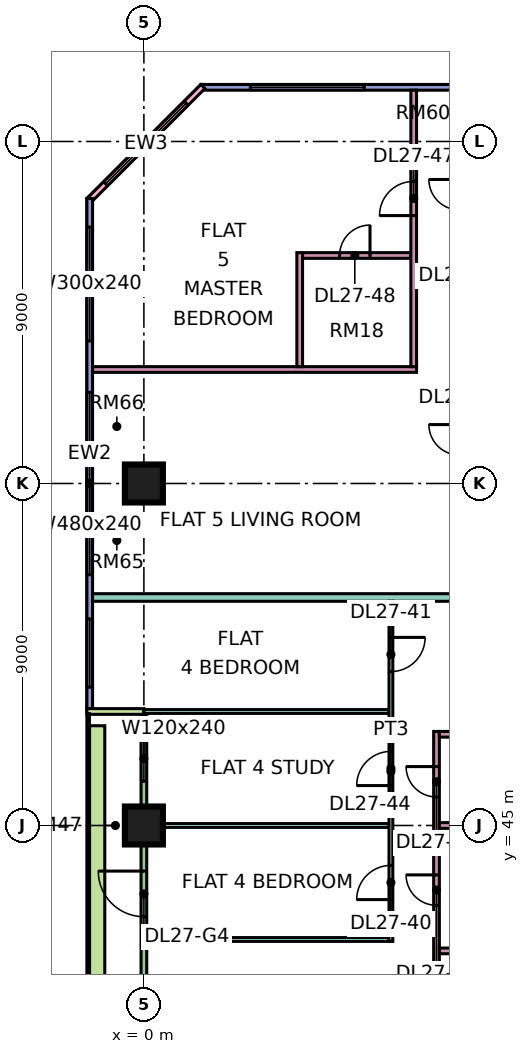
"""IFC4 building model, lengths in metres.
Left out: names, types, materials, properties, quantities, classifications, styles, units other than length and angle.
Written with IfcOpenShell. Run it as: python <this file> out.ifc"""

import sys

from ifc_helpers import new_model, si_unit, direction, frame, frame_2d, origin, origin_2d, place, context, subcontext, project, spatial, rectangle, extrude, element, fill, save


model = new_model("IFC4")
c1 = context("Model", 3, precision=1e-05, world=origin(), true_north=direction((0.0, 1.0)))
c2 = subcontext(c1, "Body", "Model", "MODEL_VIEW")
j1 = project(units=[si_unit("LENGTHUNIT", "METRE"), si_unit("PLANEANGLEUNIT", "RADIAN")], contexts=[c1])
p1 = place(None, origin())
s1 = spatial("IfcSite", under=j1, at=p1, CompositionType="ELEMENT")
p2 = place(p1, origin())
s2 = spatial("IfcBuilding", under=s1, at=p2, CompositionType="ELEMENT")
p3 = place(p2, frame((0.0, 0.0, 118.15)))
s3 = spatial("IfcBuildingStorey", under=s2, at=p3, CompositionType="ELEMENT", Elevation=118.15)
for number, where, z_axis, x_axis in (
    (1, (0.0, 45.0, 0.0), (0.0, 0.0, 1.0), (1.0, 0.0, 0.0)),
    (2, (0.0, 54.0, 0.0), (0.0, 0.0, 1.0), (1.0, 0.0, 0.0)),
):
    element("IfcColumn", number, at=place(p3, frame(where, z_axis=z_axis, x_axis=x_axis)), inside=s3, PredefinedType="COLUMN", context=c2, shape_type="SweptSolid", body=[
        extrude(rectangle(XDim=1.0, YDim=1.0, at=origin_2d()), origin(), (0.0, 0.0, 1.0), 3.75),
    ])
p4 = place(p3, frame((11.925, 64.425, 0.0), z_axis=(0.0, 0.0, 1.0), x_axis=(-1.0, 0.0, 0.0)))
e3 = element("IfcWall", 3, at=p4, inside=s3, PredefinedType="SOLIDWALL", context=c2, shape_type="SweptSolid", body=[
    extrude(rectangle(XDim=10.425, YDim=0.15, at=frame_2d((5.212, 0.0))), origin(), (0.0, 0.0, 1.0), 3.35),
])
p5 = place(p4, frame((1.212, 0.0, 1.7)))
e4 = element("IfcOpeningElement", 4, at=p5, cuts=e3, PredefinedType="OPENING", context=c2, shape_type="SweptSolid", body=[
    extrude(rectangle(XDim=1.2, YDim=0.9, at=frame_2d((0.6, 0.45))), frame((0.0, 0.085, 0.0), z_axis=(0.0, -1.0, 0.0), x_axis=(1.0, 0.0, 0.0)), (0.0, 0.0, 1.0), 0.17),
])
p6 = place(p4, frame((6.125, 0.0, 0.45)))
e5 = element("IfcOpeningElement", 5, at=p6, cuts=e3, PredefinedType="OPENING", context=c2, shape_type="SweptSolid", body=[
    extrude(rectangle(XDim=3.0, YDim=2.4, at=frame_2d((1.5, 1.2))), frame((0.0, 0.085, 0.0), z_axis=(0.0, -1.0, 0.0), x_axis=(1.0, 0.0, 0.0)), (0.0, 0.0, 1.0), 0.17),
])
p7 = place(p3, frame((1.553, 64.447, 0.0), z_axis=(0.0, 0.0, 1.0), x_axis=(-0.707106781187, -0.707106781187, 0.0)))
e6 = element("IfcWall", 6, at=p7, inside=s3, PredefinedType="SOLIDWALL", context=c2, shape_type="SweptSolid", body=[
    extrude(rectangle(XDim=4.243, YDim=0.15, at=frame_2d((2.121, 0.0))), origin(), (0.0, 0.0, 1.0), 3.35),
])
p8 = place(p7, frame((0.621, 0.0, 0.45)))
e7 = element("IfcOpeningElement", 7, at=p8, cuts=e6, PredefinedType="OPENING", context=c2, shape_type="SweptSolid", body=[
    extrude(rectangle(XDim=3.0, YDim=2.4, at=frame_2d((1.5, 1.2))), frame((0.0, 0.085, 0.0), z_axis=(0.0, -1.0, 0.0), x_axis=(1.0, 0.0, 0.0)), (0.0, 0.0, 1.0), 0.17),
])
p9 = place(p3, frame((-1.425, 61.5, 0.0), z_axis=(0.0, 0.0, 1.0), x_axis=(0.0, -1.0, 0.0)))
e8 = element("IfcWall", 8, at=p9, inside=s3, PredefinedType="SOLIDWALL", context=c2, shape_type="SweptSolid", body=[
    extrude(rectangle(XDim=13.425, YDim=0.15, at=frame_2d((6.712, 0.0))), origin(), (0.0, 0.0, 1.0), 3.35),
])
p10 = place(p9, frame((0.75, 0.0, 0.45)))
e9 = element("IfcOpeningElement", 9, at=p10, cuts=e8, PredefinedType="OPENING", context=c2, shape_type="SweptSolid", body=[
    extrude(rectangle(XDim=3.0, YDim=2.4, at=frame_2d((1.5, 1.2))), frame((0.0, 0.085, 0.0), z_axis=(0.0, -1.0, 0.0), x_axis=(1.0, 0.0, 0.0)), (0.0, 0.0, 1.0), 0.17),
])
p11 = place(p9, frame((5.1, 0.0, 0.45)))
e10 = element("IfcOpeningElement", 10, at=p11, cuts=e8, PredefinedType="OPENING", context=c2, shape_type="SweptSolid", body=[
    extrude(rectangle(XDim=4.8, YDim=2.4, at=frame_2d((2.4, 1.2))), frame((0.0, 0.085, 0.0), z_axis=(0.0, -1.0, 0.0), x_axis=(1.0, 0.0, 0.0)), (0.0, 0.0, 1.0), 0.17),
])
p12 = place(p9, frame((11.062, 0.0, 0.45)))
e11 = element("IfcOpeningElement", 11, at=p12, cuts=e8, PredefinedType="OPENING", context=c2, shape_type="SweptSolid", body=[
    extrude(rectangle(XDim=1.8, YDim=2.4, at=frame_2d((0.9, 1.2))), frame((0.0, 0.085, 0.0), z_axis=(0.0, -1.0, 0.0), x_axis=(1.0, 0.0, 0.0)), (0.0, 0.0, 1.0), 0.17),
])
p13 = place(p3, frame((0.0, 47.925, 0.0), z_axis=(0.0, 0.0, 1.0), x_axis=(0.0, -1.0, 0.0)))
e12 = element("IfcWall", 12, at=p13, inside=s3, PredefinedType="SOLIDWALL", context=c2, shape_type="SweptSolid", body=[
    extrude(rectangle(XDim=11.85, YDim=0.15, at=frame_2d((5.925, 0.0))), origin(), (0.0, 0.0, 1.0), 3.35),
])
p14 = place(p13, frame((0.562, 0.0, 0.45)))
e13 = element("IfcOpeningElement", 13, at=p14, cuts=e12, PredefinedType="OPENING", context=c2, shape_type="SweptSolid", body=[
    extrude(rectangle(XDim=1.2, YDim=2.4, at=frame_2d((0.6, 1.2))), frame((0.0, 0.085, 0.0), z_axis=(0.0, -1.0, 0.0), x_axis=(1.0, 0.0, 0.0)), (0.0, 0.0, 1.0), 0.17),
])
p15 = place(p13, frame((4.125, 0.0, 0.0)))
e14 = element("IfcOpeningElement", 14, at=p15, cuts=e12, PredefinedType="OPENING", context=c2, shape_type="SweptSolid", body=[
    extrude(rectangle(XDim=1.2, YDim=2.4, at=frame_2d((0.6, 1.2))), frame((0.0, 0.085, 0.0), z_axis=(0.0, -1.0, 0.0), x_axis=(1.0, 0.0, 0.0)), (0.0, 0.0, 1.0), 0.17),
])
p16 = place(p13, frame((7.125, 0.0, 0.45)))
e15 = element("IfcOpeningElement", 15, at=p16, cuts=e12, PredefinedType="OPENING", context=c2, shape_type="SweptSolid", body=[
    extrude(rectangle(XDim=3.0, YDim=2.4, at=frame_2d((1.5, 1.2))), frame((0.0, 0.085, 0.0), z_axis=(0.0, -1.0, 0.0), x_axis=(1.0, 0.0, 0.0)), (0.0, 0.0, 1.0), 0.17),
])
p17 = place(p3, frame((-1.5, 48.0, 0.0), z_axis=(0.0, 0.0, 1.0), x_axis=(1.0, 0.0, 0.0)))
e16 = element("IfcWall", 16, at=p17, inside=s3, PredefinedType="SOLIDWALL", context=c2, shape_type="SweptSolid", body=[
    extrude(rectangle(XDim=1.5, YDim=0.15, at=frame_2d((0.75, 0.0))), origin(), (0.0, 0.0, 1.0), 3.35),
])
p18 = place(p3, frame((-1.229, 47.625, 0.0), z_axis=(0.0, 0.0, 1.0), x_axis=(0.0, -1.0, 0.0)))
e17 = element("IfcWall", 17, at=p18, inside=s3, PredefinedType="SOLIDWALL", context=c2, shape_type="SweptSolid", body=[
    extrude(rectangle(XDim=11.25, YDim=0.4, at=frame_2d((5.625, 0.0))), origin(), (0.0, 0.0, 1.0), 0.7),
])
p19 = place(p3, frame((0.0, 48.0, 0.0), z_axis=(0.0, 0.0, 1.0), x_axis=(1.0, 0.0, 0.0)))
e18 = element("IfcWall", 18, at=p19, inside=s3, PredefinedType="PARTITIONING", context=c2, shape_type="SweptSolid", body=[
    extrude(rectangle(XDim=6.45, YDim=0.1, at=frame_2d((3.225, 0.0))), origin(), (0.0, 0.0, 1.0), 3.35),
])
p20 = place(p3, frame((-1.35, 51.0, 0.0), z_axis=(0.0, 0.0, 1.0), x_axis=(1.0, 0.0, 0.0)))
e19 = element("IfcWall", 19, at=p20, inside=s3, PredefinedType="PARTITIONING", context=c2, shape_type="SweptSolid", body=[
    extrude(rectangle(XDim=13.75, YDim=0.2, at=frame_2d((6.875, 0.0))), origin(), (0.0, 0.0, 1.0), 3.35),
])
p21 = place(p3, frame((-1.35, 57.0, 0.0), z_axis=(0.0, 0.0, 1.0), x_axis=(1.0, 0.0, 0.0)))
e20 = element("IfcWall", 20, at=p21, inside=s3, PredefinedType="PARTITIONING", context=c2, shape_type="SweptSolid", body=[
    extrude(rectangle(XDim=8.525, YDim=0.15, at=frame_2d((4.263, 0.0))), origin(), (0.0, 0.0, 1.0), 3.35),
])
for number, where, z_axis, x_axis in (
    (21, (0.074, 42.0, 0.0), (0.0, 0.0, 1.0), (1.0, 0.0, 0.0)),
    (22, (0.074, 45.0, 0.0), (0.0, 0.0, 1.0), (1.0, 0.0, 0.0)),
):
    element("IfcWall", number, at=place(p3, frame(where, z_axis=z_axis, x_axis=x_axis)), inside=s3, PredefinedType="PARTITIONING", context=c2, shape_type="SweptSolid", body=[
        extrude(rectangle(XDim=6.376, YDim=0.1, at=frame_2d((3.188, 0.0))), origin(), (0.0, 0.0, 1.0), 3.35),
    ])
p22 = place(p3, frame((4.1, 57.075, 0.0), z_axis=(0.0, 0.0, 1.0), x_axis=(0.0, 1.0, 0.0)))
e23 = element("IfcWall", 23, at=p22, inside=s3, PredefinedType="PARTITIONING", context=c2, shape_type="SweptSolid", body=[
    extrude(rectangle(XDim=3.0, YDim=0.15, at=frame_2d((1.5, 0.0))), origin(), (0.0, 0.0, 1.0), 3.35),
])
p23 = place(p3, frame((4.175, 60.0, 0.0), z_axis=(0.0, 0.0, 1.0), x_axis=(1.0, 0.0, 0.0)))
e24 = element("IfcWall", 24, at=p23, inside=s3, PredefinedType="PARTITIONING", context=c2, shape_type="SweptSolid", body=[
    extrude(rectangle(XDim=2.85, YDim=0.15, at=frame_2d((1.425, 0.0))), origin(), (0.0, 0.0, 1.0), 3.35),
])
p24 = place(p23, frame((0.975, 0.0, 0.0)))
e25 = element("IfcOpeningElement", 25, at=p24, cuts=e24, PredefinedType="OPENING", context=c2, shape_type="SweptSolid", body=[
    extrude(rectangle(XDim=0.8, YDim=2.1, at=frame_2d((0.4, 1.05))), frame((0.0, 0.085, 0.0), z_axis=(0.0, -1.0, 0.0), x_axis=(1.0, 0.0, 0.0)), (0.0, 0.0, 1.0), 0.17),
])
p25 = place(p3, frame((6.5, 41.95, 0.0), z_axis=(0.0, 0.0, 1.0), x_axis=(0.0, 1.0, 0.0)))
e26 = element("IfcWall", 26, at=p25, inside=s3, PredefinedType="PARTITIONING", context=c2, shape_type="SweptSolid", body=[
    extrude(rectangle(XDim=8.95, YDim=0.1, at=frame_2d((4.475, 0.0))), origin(), (0.0, 0.0, 1.0), 3.35),
])
p26 = place(p25, frame((1.1, 0.0, 0.0)))
e27 = element("IfcOpeningElement", 27, at=p26, cuts=e26, PredefinedType="OPENING", context=c2, shape_type="SweptSolid", body=[
    extrude(rectangle(XDim=0.9, YDim=2.1, at=frame_2d((0.45, 1.05))), frame((0.0, 0.06, 0.0), z_axis=(0.0, -1.0, 0.0), x_axis=(1.0, 0.0, 0.0)), (0.0, 0.0, 1.0), 0.12),
])
p27 = place(p25, frame((7.1, 0.0, 0.0)))
e28 = element("IfcOpeningElement", 28, at=p27, cuts=e26, PredefinedType="OPENING", context=c2, shape_type="SweptSolid", body=[
    extrude(rectangle(XDim=0.9, YDim=2.1, at=frame_2d((0.45, 1.05))), frame((0.0, 0.06, 0.0), z_axis=(0.0, -1.0, 0.0), x_axis=(1.0, 0.0, 0.0)), (0.0, 0.0, 1.0), 0.12),
])
p28 = place(p25, frame((4.1, 0.0, 0.0)))
e29 = element("IfcOpeningElement", 29, at=p28, cuts=e26, PredefinedType="OPENING", context=c2, shape_type="SweptSolid", body=[
    extrude(rectangle(XDim=0.9, YDim=2.1, at=frame_2d((0.45, 1.05))), frame((0.0, 0.06, 0.0), z_axis=(0.0, -1.0, 0.0), x_axis=(1.0, 0.0, 0.0)), (0.0, 0.0, 1.0), 0.12),
])
p29 = place(p3, frame((7.1, 57.075, 0.0), z_axis=(0.0, 0.0, 1.0), x_axis=(0.0, 1.0, 0.0)))
e30 = element("IfcWall", 30, at=p29, inside=s3, PredefinedType="PARTITIONING", context=c2, shape_type="SweptSolid", body=[
    extrude(rectangle(XDim=7.275, YDim=0.15, at=frame_2d((3.638, 0.0))), origin(), (0.0, 0.0, 1.0), 3.35),
])
p30 = place(p29, frame((3.975, 0.0, 0.0)))
e31 = element("IfcOpeningElement", 31, at=p30, cuts=e30, PredefinedType="OPENING", context=c2, shape_type="SweptSolid", body=[
    extrude(rectangle(XDim=0.9, YDim=2.1, at=frame_2d((0.45, 1.05))), frame((0.0, 0.085, 0.0), z_axis=(0.0, -1.0, 0.0), x_axis=(1.0, 0.0, 0.0)), (0.0, 0.0, 1.0), 0.17),
])
p31 = place(p3, frame((7.7, 36.1, 0.0), z_axis=(0.0, 0.0, 1.0), x_axis=(0.0, 1.0, 0.0)))
e32 = element("IfcWall", 32, at=p31, inside=s3, PredefinedType="PARTITIONING", context=c2, shape_type="SweptSolid", body=[
    extrude(rectangle(XDim=11.375, YDim=0.15, at=frame_2d((5.688, 0.0))), origin(), (0.0, 0.0, 1.0), 3.35),
])
p32 = place(p31, frame((9.65, 0.0, 0.0)))
e33 = element("IfcOpeningElement", 33, at=p32, cuts=e32, PredefinedType="OPENING", context=c2, shape_type="SweptSolid", body=[
    extrude(rectangle(XDim=0.8, YDim=2.1, at=frame_2d((0.4, 1.05))), frame((0.0, 0.085, 0.0), z_axis=(0.0, -1.0, 0.0), x_axis=(1.0, 0.0, 0.0)), (0.0, 0.0, 1.0), 0.17),
])
p33 = place(p31, frame((2.3, 0.0, 0.0)))
e34 = element("IfcOpeningElement", 34, at=p33, cuts=e32, PredefinedType="OPENING", context=c2, shape_type="SweptSolid", body=[
    extrude(rectangle(XDim=0.9, YDim=2.1, at=frame_2d((0.45, 1.05))), frame((0.0, 0.085, 0.0), z_axis=(0.0, -1.0, 0.0), x_axis=(1.0, 0.0, 0.0)), (0.0, 0.0, 1.0), 0.17),
])
p34 = place(p31, frame((6.8, 0.0, 0.0)))
e35 = element("IfcOpeningElement", 35, at=p34, cuts=e32, PredefinedType="OPENING", context=c2, shape_type="SweptSolid", body=[
    extrude(rectangle(XDim=0.8, YDim=2.1, at=frame_2d((0.4, 1.05))), frame((0.0, 0.085, 0.0), z_axis=(0.0, -1.0, 0.0), x_axis=(1.0, 0.0, 0.0)), (0.0, 0.0, 1.0), 0.17),
])
for number, where, z_axis, x_axis in (
    (36, (7.775, 41.7, 0.0), (0.0, 0.0, 1.0), (1.0, 0.0, 0.0)),
    (37, (7.775, 45.0, 0.0), (0.0, 0.0, 1.0), (1.0, 0.0, 0.0)),
    (38, (7.775, 47.4, 0.0), (0.0, 0.0, 1.0), (1.0, 0.0, 0.0)),
):
    element("IfcWall", number, at=place(p3, frame(where, z_axis=z_axis, x_axis=x_axis)), inside=s3, PredefinedType="PARTITIONING", context=c2, shape_type="SweptSolid", body=[
        extrude(rectangle(XDim=4.625, YDim=0.15, at=frame_2d((2.312, 0.0))), origin(), (0.0, 0.0, 1.0), 3.35),
    ])
p35 = place(p6, origin())
e39 = element("IfcWindow", 39, at=p35, inside=s3, PartitioningType="SINGLE_PANEL", PredefinedType="WINDOW", context=c2, shape_type="SweptSolid", body=[
    extrude(rectangle(XDim=3.0, YDim=2.4, at=frame_2d((1.5, 1.2))), frame((0.0, 0.03, 0.0), z_axis=(0.0, -1.0, 0.0), x_axis=(1.0, 0.0, 0.0)), (0.0, 0.0, 1.0), 0.06),
])
fill(e5, e39)
p36 = place(p8, origin())
e40 = element("IfcWindow", 40, at=p36, inside=s3, PartitioningType="SINGLE_PANEL", PredefinedType="WINDOW", context=c2, shape_type="SweptSolid", body=[
    extrude(rectangle(XDim=3.0, YDim=2.4, at=frame_2d((1.5, 1.2))), frame((0.0, 0.03, 0.0), z_axis=(0.0, -1.0, 0.0), x_axis=(1.0, 0.0, 0.0)), (0.0, 0.0, 1.0), 0.06),
])
fill(e7, e40)
p37 = place(p10, origin())
e41 = element("IfcWindow", 41, at=p37, inside=s3, PartitioningType="SINGLE_PANEL", PredefinedType="WINDOW", context=c2, shape_type="SweptSolid", body=[
    extrude(rectangle(XDim=3.0, YDim=2.4, at=frame_2d((1.5, 1.2))), frame((0.0, 0.03, 0.0), z_axis=(0.0, -1.0, 0.0), x_axis=(1.0, 0.0, 0.0)), (0.0, 0.0, 1.0), 0.06),
])
fill(e9, e41)
p38 = place(p11, origin())
e42 = element("IfcWindow", 42, at=p38, inside=s3, PartitioningType="SINGLE_PANEL", PredefinedType="WINDOW", context=c2, shape_type="SweptSolid", body=[
    extrude(rectangle(XDim=4.8, YDim=2.4, at=frame_2d((2.4, 1.2))), frame((0.0, 0.03, 0.0), z_axis=(0.0, -1.0, 0.0), x_axis=(1.0, 0.0, 0.0)), (0.0, 0.0, 1.0), 0.06),
])
fill(e10, e42)
p39 = place(p12, origin())
e43 = element("IfcWindow", 43, at=p39, inside=s3, PartitioningType="SINGLE_PANEL", PredefinedType="WINDOW", context=c2, shape_type="SweptSolid", body=[
    extrude(rectangle(XDim=1.8, YDim=2.4, at=frame_2d((0.9, 1.2))), frame((0.0, 0.03, 0.0), z_axis=(0.0, -1.0, 0.0), x_axis=(1.0, 0.0, 0.0)), (0.0, 0.0, 1.0), 0.06),
])
fill(e11, e43)
p40 = place(p14, origin())
e44 = element("IfcWindow", 44, at=p40, inside=s3, PartitioningType="SINGLE_PANEL", PredefinedType="WINDOW", context=c2, shape_type="SweptSolid", body=[
    extrude(rectangle(XDim=1.2, YDim=2.4, at=frame_2d((0.6, 1.2))), frame((0.0, 0.03, 0.0), z_axis=(0.0, -1.0, 0.0), x_axis=(1.0, 0.0, 0.0)), (0.0, 0.0, 1.0), 0.06),
])
fill(e13, e44)
p41 = place(p15, frame((1.2, 0.0, 0.0), z_axis=(0.0, 0.0, 1.0), x_axis=(-1.0, 0.0, 0.0)))
e45 = element("IfcDoor", 45, at=p41, inside=s3, OperationType="DOUBLE_DOOR_SINGLE_SWING", PredefinedType="DOOR", context=c2, shape_type="SweptSolid", body=[
    extrude(rectangle(XDim=1.2, YDim=2.4, at=frame_2d((0.6, 1.2))), frame((0.0, 0.025, 0.0), z_axis=(0.0, -1.0, 0.0), x_axis=(1.0, 0.0, 0.0)), (0.0, 0.0, 1.0), 0.05),
])
fill(e14, e45)
p42 = place(p32, frame((0.8, 0.0, 0.0), z_axis=(0.0, 0.0, 1.0), x_axis=(-1.0, 0.0, 0.0)))
e46 = element("IfcDoor", 46, at=p42, inside=s3, OperationType="SINGLE_SWING_RIGHT", PredefinedType="DOOR", context=c2, shape_type="SweptSolid", body=[
    extrude(rectangle(XDim=0.8, YDim=2.1, at=frame_2d((0.4, 1.05))), frame((0.0, 0.025, 0.0), z_axis=(0.0, -1.0, 0.0), x_axis=(1.0, 0.0, 0.0)), (0.0, 0.0, 1.0), 0.05),
])
fill(e33, e46)
p43 = place(p26, origin())
e47 = element("IfcDoor", 47, at=p43, inside=s3, OperationType="SINGLE_SWING_LEFT", PredefinedType="DOOR", context=c2, shape_type="SweptSolid", body=[
    extrude(rectangle(XDim=0.9, YDim=2.1, at=frame_2d((0.45, 1.05))), frame((0.0, 0.025, 0.0), z_axis=(0.0, -1.0, 0.0), x_axis=(1.0, 0.0, 0.0)), (0.0, 0.0, 1.0), 0.05),
])
fill(e27, e47)
p44 = place(p27, origin())
e48 = element("IfcDoor", 48, at=p44, inside=s3, OperationType="SINGLE_SWING_RIGHT", PredefinedType="DOOR", context=c2, shape_type="SweptSolid", body=[
    extrude(rectangle(XDim=0.9, YDim=2.1, at=frame_2d((0.45, 1.05))), frame((0.0, 0.025, 0.0), z_axis=(0.0, -1.0, 0.0), x_axis=(1.0, 0.0, 0.0)), (0.0, 0.0, 1.0), 0.05),
])
fill(e28, e48)
p45 = place(p28, origin())
e49 = element("IfcDoor", 49, at=p45, inside=s3, OperationType="SINGLE_SWING_LEFT", PredefinedType="DOOR", context=c2, shape_type="SweptSolid", body=[
    extrude(rectangle(XDim=0.9, YDim=2.1, at=frame_2d((0.45, 1.05))), frame((0.0, 0.025, 0.0), z_axis=(0.0, -1.0, 0.0), x_axis=(1.0, 0.0, 0.0)), (0.0, 0.0, 1.0), 0.05),
])
fill(e29, e49)
p46 = place(p34, frame((0.8, 0.0, 0.0), z_axis=(0.0, 0.0, 1.0), x_axis=(-1.0, 0.0, 0.0)))
e50 = element("IfcDoor", 50, at=p46, inside=s3, OperationType="SINGLE_SWING_RIGHT", PredefinedType="DOOR", context=c2, shape_type="SweptSolid", body=[
    extrude(rectangle(XDim=0.8, YDim=2.1, at=frame_2d((0.4, 1.05))), frame((0.0, 0.025, 0.0), z_axis=(0.0, -1.0, 0.0), x_axis=(1.0, 0.0, 0.0)), (0.0, 0.0, 1.0), 0.05),
])
fill(e35, e50)
p47 = place(p30, origin())
e51 = element("IfcDoor", 51, at=p47, inside=s3, OperationType="SINGLE_SWING_LEFT", PredefinedType="DOOR", context=c2, shape_type="SweptSolid", body=[
    extrude(rectangle(XDim=0.9, YDim=2.1, at=frame_2d((0.45, 1.05))), frame((0.0, 0.025, 0.0), z_axis=(0.0, -1.0, 0.0), x_axis=(1.0, 0.0, 0.0)), (0.0, 0.0, 1.0), 0.05),
])
fill(e31, e51)
p48 = place(p24, frame((0.8, 0.0, 0.0), z_axis=(0.0, 0.0, 1.0), x_axis=(-1.0, 0.0, 0.0)))
e52 = element("IfcDoor", 52, at=p48, inside=s3, OperationType="SINGLE_SWING_RIGHT", PredefinedType="DOOR", context=c2, shape_type="SweptSolid", body=[
    extrude(rectangle(XDim=0.8, YDim=2.1, at=frame_2d((0.4, 1.05))), frame((0.0, 0.025, 0.0), z_axis=(0.0, -1.0, 0.0), x_axis=(1.0, 0.0, 0.0)), (0.0, 0.0, 1.0), 0.05),
])
fill(e25, e52)
save(model, sys.argv[1])
